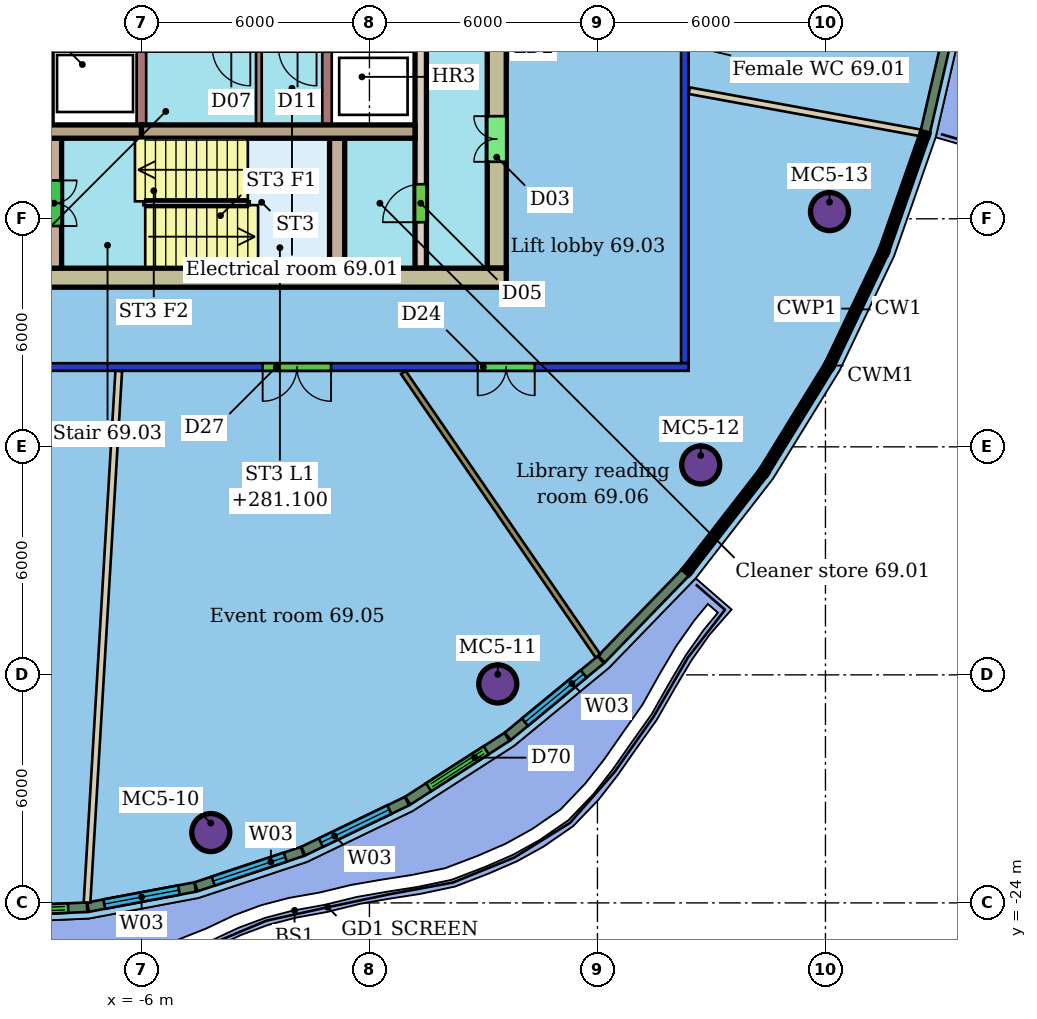
"""IFC4 building model, lengths in metres.
Left out: names, types, materials, properties, quantities, classifications, styles, units other than length and angle.
Written with IfcOpenShell. Run it as: python <this file> out.ifc"""

import sys

from ifc_helpers import new_model, si_unit, direction, frame, frame_2d, origin, origin_2d, place, context, subcontext, project, spatial, rectangle, hollow_circle, extrude, element, fill, save


model = new_model("IFC4")
c1 = context("Model", 3, precision=1e-05, world=origin(), true_north=direction((0.0, 1.0)))
c2 = subcontext(c1, "Body", "Model", "MODEL_VIEW")
j1 = project(units=[si_unit("LENGTHUNIT", "METRE"), si_unit("PLANEANGLEUNIT", "RADIAN")], contexts=[c1])
p1 = place(None, origin())
s1 = spatial("IfcSite", under=j1, at=p1, CompositionType="ELEMENT")
p2 = place(p1, origin())
s2 = spatial("IfcBuilding", under=s1, at=p2, CompositionType="ELEMENT")
p3 = place(p2, frame((0.0, 0.0, 279.3)))
s3 = spatial("IfcBuildingStorey", under=s2, at=p3, CompositionType="ELEMENT", Elevation=279.3)
for number, where, z_axis, x_axis in (
    (1, (-4.175, -22.149, 0.0), (0.0, 0.0, 1.0), (1.0, 0.0, 0.0)),
    (2, (3.377, -18.238, 0.0), (0.0, 0.0, 1.0), (1.0, 0.0, 0.0)),
    (3, (8.718, -12.477, 0.0), (0.0, 0.0, 1.0), (1.0, 0.0, 0.0)),
    (4, (12.106, -5.81, 0.0), (0.0, 0.0, 1.0), (1.0, 0.0, 0.0)),
):
    element("IfcColumn", number, at=place(p3, frame(where, z_axis=z_axis, x_axis=x_axis)), inside=s3, PredefinedType="COLUMN", context=c2, shape_type="SweptSolid", body=[
        extrude(hollow_circle(Radius=0.5, WallThickness=0.04, at=origin_2d()), origin(), (0.0, 0.0, 1.0), 3.45),
    ])
p4 = place(p3, frame((8.4, -9.9, 0.0), z_axis=(0.0, 0.0, 1.0), x_axis=(-1.0, 0.0, 0.0)))
e5 = element("IfcWall", 5, at=p4, inside=s3, PredefinedType="PARTITIONING", context=c2, shape_type="SweptSolid", body=[
    extrude(rectangle(XDim=28.8, YDim=0.2, at=frame_2d((14.4, 0.0))), origin(), (0.0, 0.0, 1.0), 3.1),
])
p5 = place(p4, frame((17.804, 0.0, 0.0)))
e6 = element("IfcOpeningElement", 6, at=p5, cuts=e5, PredefinedType="OPENING", context=c2, shape_type="SweptSolid", body=[
    extrude(rectangle(XDim=1.5, YDim=2.4, at=frame_2d((0.75, 1.2))), frame((0.0, 0.11, 0.0), z_axis=(0.0, -1.0, 0.0), x_axis=(1.0, 0.0, 0.0)), (0.0, 0.0, 1.0), 0.22),
])
p6 = place(p4, frame((9.41, 0.0, 0.0)))
e7 = element("IfcOpeningElement", 7, at=p6, cuts=e5, PredefinedType="OPENING", context=c2, shape_type="SweptSolid", body=[
    extrude(rectangle(XDim=1.8, YDim=2.4, at=frame_2d((0.9, 1.2))), frame((0.0, 0.11, 0.0), z_axis=(0.0, -1.0, 0.0), x_axis=(1.0, 0.0, 0.0)), (0.0, 0.0, 1.0), 0.22),
])
p7 = place(p4, frame((4.051, 0.0, 0.0)))
e8 = element("IfcOpeningElement", 8, at=p7, cuts=e5, PredefinedType="OPENING", context=c2, shape_type="SweptSolid", body=[
    extrude(rectangle(XDim=1.5, YDim=2.1, at=frame_2d((0.75, 1.05))), frame((0.0, 0.11, 0.0), z_axis=(0.0, -1.0, 0.0), x_axis=(1.0, 0.0, 0.0)), (0.0, 0.0, 1.0), 0.22),
])
p8 = place(p3, frame((8.3, 9.8, 0.0), z_axis=(0.0, 0.0, 1.0), x_axis=(0.0, -1.0, 0.0)))
e9 = element("IfcWall", 9, at=p8, inside=s3, PredefinedType="PARTITIONING", context=c2, shape_type="SweptSolid", body=[
    extrude(rectangle(XDim=19.6, YDim=0.2, at=frame_2d((9.8, 0.0))), origin(), (0.0, 0.0, 1.0), 3.1),
])
p9 = place(p8, frame((7.656, 0.0, 0.0)))
e10 = element("IfcOpeningElement", 10, at=p9, cuts=e9, PredefinedType="OPENING", context=c2, shape_type="SweptSolid", body=[
    extrude(rectangle(XDim=1.5, YDim=2.4, at=frame_2d((0.75, 1.2))), frame((0.0, 0.11, 0.0), z_axis=(0.0, -1.0, 0.0), x_axis=(1.0, 0.0, 0.0)), (0.0, 0.0, 1.0), 0.22),
])
p10 = place(p3, frame((-7.431, -23.99, 0.0), z_axis=(0.0, 0.0, 1.0), x_axis=(0.059548467955, 0.998225415407, 0.0)))
e11 = element("IfcWall", 11, at=p10, inside=s3, PredefinedType="PARTITIONING", context=c2, shape_type="SweptSolid", body=[
    extrude(rectangle(XDim=14.009, YDim=0.175, at=frame_2d((7.005, 0.0))), origin(), (0.0, 0.0, 1.0), 3.45),
])
p11 = place(p3, frame((6.013, -17.503, 0.0), z_axis=(0.0, 0.0, 1.0), x_axis=(-0.565875944345, 0.824490397525, 0.0)))
e12 = element("IfcWall", 12, at=p11, inside=s3, PredefinedType="PARTITIONING", context=c2, shape_type="SweptSolid", body=[
    extrude(rectangle(XDim=9.049, YDim=0.15, at=frame_2d((4.524, 0.0))), origin(), (0.0, 0.0, 1.0), 3.45),
])
p12 = place(p3, frame((14.492, -3.738, 0.0), z_axis=(0.0, 0.0, 1.0), x_axis=(-0.98376729686, 0.1794488942, 0.0)))
e13 = element("IfcWall", 13, at=p12, inside=s3, PredefinedType="PARTITIONING", context=c2, shape_type="SweptSolid", body=[
    extrude(rectangle(XDim=6.177, YDim=0.175, at=frame_2d((3.088, 0.0))), origin(), (0.0, 0.0, 1.0), 3.45),
])
p13 = place(p3, frame((-10.221, -24.235, 0.0), z_axis=(0.0, 0.0, 1.0), x_axis=(0.999063892299, 0.043258977142, 0.0)))
e14 = element("IfcWall", 14, at=p13, inside=s3, PredefinedType="SOLIDWALL", context=c2, shape_type="SweptSolid", body=[
    extrude(rectangle(XDim=2.794, YDim=0.25, at=frame_2d((1.397, 0.0))), origin(), (0.0, 0.0, 1.0), 3.15),
])
p14 = place(p13, frame((0.497, 0.0, 0.0)))
e15 = element("IfcOpeningElement", 15, at=p14, cuts=e14, PredefinedType="OPENING", context=c2, shape_type="SweptSolid", body=[
    extrude(rectangle(XDim=1.8, YDim=2.4, at=frame_2d((0.9, 1.2))), frame((0.0, 0.135, 0.0), z_axis=(0.0, -1.0, 0.0), x_axis=(1.0, 0.0, 0.0)), (0.0, 0.0, 1.0), 0.27),
])
p15 = place(p3, frame((-7.404, -24.111, 0.0), z_axis=(0.0, 0.0, 1.0), x_axis=(0.982821071431, 0.184560942647, 0.0)))
e16 = element("IfcWall", 16, at=p15, inside=s3, PredefinedType="SOLIDWALL", context=c2, shape_type="SweptSolid", body=[
    extrude(rectangle(XDim=2.868, YDim=0.25, at=frame_2d((1.434, 0.0))), origin(), (0.0, 0.0, 1.0), 3.15),
])
p16 = place(p15, frame((0.434, 0.0, 0.9)))
e17 = element("IfcOpeningElement", 17, at=p16, cuts=e16, PredefinedType="OPENING", context=c2, shape_type="SweptSolid", body=[
    extrude(rectangle(XDim=2.0, YDim=2.1, at=frame_2d((1.0, 1.05))), frame((0.0, 0.135, 0.0), z_axis=(0.0, -1.0, 0.0), x_axis=(1.0, 0.0, 0.0)), (0.0, 0.0, 1.0), 0.27),
])
p17 = place(p3, frame((-4.562, -23.576, 0.0), z_axis=(0.0, 0.0, 1.0), x_axis=(0.948964440236, 0.315383086368, 0.0)))
e18 = element("IfcWall", 18, at=p17, inside=s3, PredefinedType="SOLIDWALL", context=c2, shape_type="SweptSolid", body=[
    extrude(rectangle(XDim=2.948, YDim=0.25, at=frame_2d((1.474, 0.0))), origin(), (0.0, 0.0, 1.0), 3.15),
])
p18 = place(p17, frame((0.474, 0.0, 0.9)))
e19 = element("IfcOpeningElement", 19, at=p18, cuts=e18, PredefinedType="OPENING", context=c2, shape_type="SweptSolid", body=[
    extrude(rectangle(XDim=2.0, YDim=2.1, at=frame_2d((1.0, 1.05))), frame((0.0, 0.135, 0.0), z_axis=(0.0, -1.0, 0.0), x_axis=(1.0, 0.0, 0.0)), (0.0, 0.0, 1.0), 0.27),
])
p19 = place(p3, frame((-1.741, -22.637, 0.0), z_axis=(0.0, 0.0, 1.0), x_axis=(0.900781065891, 0.434273498308, 0.0)))
e20 = element("IfcWall", 20, at=p19, inside=s3, PredefinedType="SOLIDWALL", context=c2, shape_type="SweptSolid", body=[
    extrude(rectangle(XDim=3.03, YDim=0.25, at=frame_2d((1.515, 0.0))), origin(), (0.0, 0.0, 1.0), 3.15),
])
p20 = place(p19, frame((0.515, 0.0, 0.9)))
e21 = element("IfcOpeningElement", 21, at=p20, cuts=e20, PredefinedType="OPENING", context=c2, shape_type="SweptSolid", body=[
    extrude(rectangle(XDim=2.0, YDim=2.1, at=frame_2d((1.0, 1.05))), frame((0.0, 0.135, 0.0), z_axis=(0.0, -1.0, 0.0), x_axis=(1.0, 0.0, 0.0)), (0.0, 0.0, 1.0), 0.27),
])
p21 = place(p3, frame((1.008, -21.31, 0.0), z_axis=(0.0, 0.0, 1.0), x_axis=(0.841150380815, 0.540801291469, 0.0)))
e22 = element("IfcWall", 22, at=p21, inside=s3, PredefinedType="SOLIDWALL", context=c2, shape_type="SweptSolid", body=[
    extrude(rectangle(XDim=3.106, YDim=0.25, at=frame_2d((1.553, 0.0))), origin(), (0.0, 0.0, 1.0), 3.15),
])
p22 = place(p21, frame((0.653, 0.0, 0.0)))
e23 = element("IfcOpeningElement", 23, at=p22, cuts=e22, PredefinedType="OPENING", context=c2, shape_type="SweptSolid", body=[
    extrude(rectangle(XDim=1.8, YDim=2.4, at=frame_2d((0.9, 1.2))), frame((0.0, 0.135, 0.0), z_axis=(0.0, -1.0, 0.0), x_axis=(1.0, 0.0, 0.0)), (0.0, 0.0, 1.0), 0.27),
])
p23 = place(p3, frame((3.639, -19.617, 0.0), z_axis=(0.0, 0.0, 1.0), x_axis=(0.772343261753, 0.635205388851, 0.0)))
e24 = element("IfcWall", 24, at=p23, inside=s3, PredefinedType="SOLIDWALL", context=c2, shape_type="SweptSolid", body=[
    extrude(rectangle(XDim=3.172, YDim=0.25, at=frame_2d((1.586, 0.0))), origin(), (0.0, 0.0, 1.0), 3.15),
])
p24 = place(p23, frame((0.586, 0.0, 0.9)))
e25 = element("IfcOpeningElement", 25, at=p24, cuts=e24, PredefinedType="OPENING", context=c2, shape_type="SweptSolid", body=[
    extrude(rectangle(XDim=2.0, YDim=2.1, at=frame_2d((1.0, 1.05))), frame((0.0, 0.135, 0.0), z_axis=(0.0, -1.0, 0.0), x_axis=(1.0, 0.0, 0.0)), (0.0, 0.0, 1.0), 0.27),
])
p25 = place(p3, frame((6.105, -17.587, 0.0), z_axis=(0.0, 0.0, 1.0), x_axis=(0.695972067976, 0.718068855053, 0.0)))
e26 = element("IfcWall", 26, at=p25, inside=s3, PredefinedType="SOLIDWALL", context=c2, shape_type="SweptSolid", body=[
    extrude(rectangle(XDim=3.182, YDim=0.25, at=frame_2d((1.591, 0.0))), origin(), (0.0, 0.0, 1.0), 3.15),
])
p26 = place(p3, frame((14.625, -3.719, 0.0), z_axis=(0.0, 0.0, 1.0), x_axis=(0.225201327467, 0.974312250825, 0.0)))
e27 = element("IfcWall", 27, at=p26, inside=s3, PredefinedType="SOLIDWALL", context=c2, shape_type="SweptSolid", body=[
    extrude(rectangle(XDim=3.182, YDim=0.25, at=frame_2d((1.591, 0.0))), origin(), (0.0, 0.0, 1.0), 3.15),
])
p27 = place(p3, frame((-15.6, -7.55, 0.0), z_axis=(0.0, 0.0, 1.0), x_axis=(1.0, 0.0, 0.0)))
e28 = element("IfcWall", 28, at=p27, inside=s3, PredefinedType="SHEAR", context=c2, shape_type="SweptSolid", body=[
    extrude(rectangle(XDim=19.2, YDim=0.5, at=frame_2d((9.6, 0.0))), origin(), (0.0, 0.0, 1.0), 3.3),
])
p28 = place(p27, frame((3.6, 0.0, 0.0)))
e29 = element("IfcOpeningElement", 29, at=p28, cuts=e28, PredefinedType="OPENING", context=c2, shape_type="SweptSolid", body=[
    extrude(rectangle(XDim=1.2, YDim=2.1, at=frame_2d((0.6, 1.05))), frame((0.0, 0.26, 0.0), z_axis=(0.0, -1.0, 0.0), x_axis=(1.0, 0.0, 0.0)), (0.0, 0.0, 1.0), 0.52),
])
p29 = place(p3, frame((3.35, -7.3, 0.0), z_axis=(0.0, 0.0, 1.0), x_axis=(0.0, 1.0, 0.0)))
e30 = element("IfcWall", 30, at=p29, inside=s3, PredefinedType="SHEAR", context=c2, shape_type="SweptSolid", body=[
    extrude(rectangle(XDim=14.6, YDim=0.5, at=frame_2d((7.3, 0.0))), origin(), (0.0, 0.0, 1.0), 3.3),
])
p30 = place(p29, frame((2.8, 0.0, 0.0)))
e31 = element("IfcOpeningElement", 31, at=p30, cuts=e30, PredefinedType="OPENING", context=c2, shape_type="SweptSolid", body=[
    extrude(rectangle(XDim=1.2, YDim=2.1, at=frame_2d((0.6, 1.05))), frame((0.0, 0.26, 0.0), z_axis=(0.0, -1.0, 0.0), x_axis=(1.0, 0.0, 0.0)), (0.0, 0.0, 1.0), 0.52),
])
p31 = place(p29, frame((10.6, 0.0, 0.0)))
e32 = element("IfcOpeningElement", 32, at=p31, cuts=e30, PredefinedType="OPENING", context=c2, shape_type="SweptSolid", body=[
    extrude(rectangle(XDim=1.2, YDim=2.1, at=frame_2d((0.6, 1.05))), frame((0.0, 0.26, 0.0), z_axis=(0.0, -1.0, 0.0), x_axis=(1.0, 0.0, 0.0)), (0.0, 0.0, 1.0), 0.52),
])
p32 = place(p3, frame((-13.2, -3.705, 0.0), z_axis=(0.0, 0.0, 1.0), x_axis=(1.0, 0.0, 0.0)))
e33 = element("IfcWall", 33, at=p32, inside=s3, PredefinedType="SHEAR", context=c2, shape_type="SweptSolid", body=[
    extrude(rectangle(XDim=7.2, YDim=0.35, at=frame_2d((3.6, 0.0))), origin(), (0.0, 0.0, 1.0), 3.3),
])
p33 = place(p32, frame((0.496, 0.0, 0.0)))
e34 = element("IfcOpeningElement", 34, at=p33, cuts=e33, PredefinedType="OPENING", context=c2, shape_type="SweptSolid", body=[
    extrude(rectangle(XDim=1.2, YDim=2.1, at=frame_2d((0.6, 1.05))), frame((0.0, 0.185, 0.0), z_axis=(0.0, -1.0, 0.0), x_axis=(1.0, 0.0, 0.0)), (0.0, 0.0, 1.0), 0.37),
])
p34 = place(p32, frame((2.938, 0.0, 0.0)))
e35 = element("IfcOpeningElement", 35, at=p34, cuts=e33, PredefinedType="OPENING", context=c2, shape_type="SweptSolid", body=[
    extrude(rectangle(XDim=1.2, YDim=2.1, at=frame_2d((0.6, 1.05))), frame((0.0, 0.185, 0.0), z_axis=(0.0, -1.0, 0.0), x_axis=(1.0, 0.0, 0.0)), (0.0, 0.0, 1.0), 0.37),
])
p35 = place(p3, frame((-6.0, -3.705, 0.0), z_axis=(0.0, 0.0, 1.0), x_axis=(1.0, 0.0, 0.0)))
e36 = element("IfcWall", 36, at=p35, inside=s3, PredefinedType="SHEAR", context=c2, shape_type="SweptSolid", body=[
    extrude(rectangle(XDim=7.2, YDim=0.35, at=frame_2d((3.6, 0.0))), origin(), (0.0, 0.0, 1.0), 3.3),
])
p36 = place(p3, frame((1.35, -7.3, 0.0), z_axis=(0.0, 0.0, 1.0), x_axis=(0.0, 1.0, 0.0)))
e37 = element("IfcWall", 37, at=p36, inside=s3, PredefinedType="SHEAR", context=c2, shape_type="SweptSolid", body=[
    extrude(rectangle(XDim=14.6, YDim=0.3, at=frame_2d((7.3, 0.0))), origin(), (0.0, 0.0, 1.0), 3.3),
])
p37 = place(p36, frame((1.21, 0.0, 0.0)))
e38 = element("IfcOpeningElement", 38, at=p37, cuts=e37, PredefinedType="OPENING", context=c2, shape_type="SweptSolid", body=[
    extrude(rectangle(XDim=1.0, YDim=2.1, at=frame_2d((0.5, 1.05))), frame((0.0, 0.16, 0.0), z_axis=(0.0, -1.0, 0.0), x_axis=(1.0, 0.0, 0.0)), (0.0, 0.0, 1.0), 0.32),
])
p38 = place(p36, frame((6.55, 0.0, 0.0)))
e39 = element("IfcOpeningElement", 39, at=p38, cuts=e37, PredefinedType="OPENING", context=c2, shape_type="SweptSolid", body=[
    extrude(rectangle(XDim=1.5, YDim=2.1, at=frame_2d((0.75, 1.05))), frame((0.0, 0.16, 0.0), z_axis=(0.0, -1.0, 0.0), x_axis=(1.0, 0.0, 0.0)), (0.0, 0.0, 1.0), 0.32),
])
p39 = place(p3, frame((-8.3, -3.88, 0.0), z_axis=(0.0, 0.0, 1.0), x_axis=(0.0, -1.0, 0.0)))
e40 = element("IfcWall", 40, at=p39, inside=s3, PredefinedType="SHEAR", context=c2, shape_type="SweptSolid", body=[
    extrude(rectangle(XDim=3.42, YDim=0.4, at=frame_2d((1.71, 0.0))), origin(), (0.0, 0.0, 1.0), 3.3),
])
p40 = place(p39, frame((1.11, 0.0, 0.0)))
e41 = element("IfcOpeningElement", 41, at=p40, cuts=e40, PredefinedType="OPENING", context=c2, shape_type="SweptSolid", body=[
    extrude(rectangle(XDim=1.2, YDim=2.1, at=frame_2d((0.6, 1.05))), frame((0.0, 0.21, 0.0), z_axis=(0.0, -1.0, 0.0), x_axis=(1.0, 0.0, 0.0)), (0.0, 0.0, 1.0), 0.42),
])
p41 = place(p3, frame((-0.85, -3.88, 0.0), z_axis=(0.0, 0.0, 1.0), x_axis=(0.0, -1.0, 0.0)))
e42 = element("IfcWall", 42, at=p41, inside=s3, PredefinedType="SHEAR", context=c2, shape_type="SweptSolid", body=[
    extrude(rectangle(XDim=3.42, YDim=0.4, at=frame_2d((1.71, 0.0))), origin(), (0.0, 0.0, 1.0), 3.3),
])
for number, where, z_axis, x_axis in (
    (43, (-8.442, -1.6, 0.0), (0.0, 0.0, 1.0), (0.0, -1.0, 0.0)),
    (44, (-6.0, -1.6, 0.0), (0.0, 0.0, 1.0), (0.0, -1.0, 0.0)),
    (45, (-1.117, -1.6, 0.0), (0.0, 0.0, 1.0), (0.0, -1.0, 0.0)),
):
    element("IfcWall", number, at=place(p3, frame(where, z_axis=z_axis, x_axis=x_axis)), inside=s3, PredefinedType="SHEAR", context=c2, shape_type="SweptSolid", body=[
        extrude(rectangle(XDim=1.93, YDim=0.25, at=frame_2d((0.965, 0.0))), origin(), (0.0, 0.0, 1.0), 3.3),
    ])
p42 = place(p3, frame((-2.91, -1.6, 0.0), z_axis=(0.0, 0.0, 1.0), x_axis=(0.0, -1.0, 0.0)))
e46 = element("IfcWall", 46, at=p42, inside=s3, PredefinedType="PARTITIONING", context=c2, shape_type="SweptSolid", body=[
    extrude(rectangle(XDim=1.93, YDim=0.15, at=frame_2d((0.965, 0.0))), origin(), (0.0, 0.0, 1.0), 3.3),
])
p43 = place(p6, origin())
e47 = element("IfcDoor", 47, at=p43, inside=s3, OperationType="DOUBLE_DOOR_SINGLE_SWING", PredefinedType="DOOR", context=c2, shape_type="SweptSolid", body=[
    extrude(rectangle(XDim=1.8, YDim=2.4, at=frame_2d((0.9, 1.2))), frame((0.0, 0.025, 0.0), z_axis=(0.0, -1.0, 0.0), x_axis=(1.0, 0.0, 0.0)), (0.0, 0.0, 1.0), 0.05),
])
fill(e7, e47)
p44 = place(p7, origin())
e48 = element("IfcDoor", 48, at=p44, inside=s3, OperationType="DOUBLE_DOOR_SINGLE_SWING", PredefinedType="DOOR", context=c2, shape_type="SweptSolid", body=[
    extrude(rectangle(XDim=1.5, YDim=2.1, at=frame_2d((0.75, 1.05))), frame((0.0, 0.025, 0.0), z_axis=(0.0, -1.0, 0.0), x_axis=(1.0, 0.0, 0.0)), (0.0, 0.0, 1.0), 0.05),
])
fill(e8, e48)
p45 = place(p14, origin())
e49 = element("IfcDoor", 49, at=p45, inside=s3, OperationType="DOUBLE_DOOR_SLIDING", PredefinedType="DOOR", context=c2, shape_type="SweptSolid", body=[
    extrude(rectangle(XDim=1.8, YDim=2.4, at=frame_2d((0.9, 1.2))), frame((0.0, 0.025, 0.0), z_axis=(0.0, -1.0, 0.0), x_axis=(1.0, 0.0, 0.0)), (0.0, 0.0, 1.0), 0.05),
])
fill(e15, e49)
p46 = place(p16, origin())
e50 = element("IfcWindow", 50, at=p46, inside=s3, PartitioningType="SINGLE_PANEL", PredefinedType="WINDOW", context=c2, shape_type="SweptSolid", body=[
    extrude(rectangle(XDim=2.0, YDim=2.1, at=frame_2d((1.0, 1.05))), frame((0.0, 0.03, 0.0), z_axis=(0.0, -1.0, 0.0), x_axis=(1.0, 0.0, 0.0)), (0.0, 0.0, 1.0), 0.06),
])
fill(e17, e50)
p47 = place(p18, origin())
e51 = element("IfcWindow", 51, at=p47, inside=s3, PartitioningType="SINGLE_PANEL", PredefinedType="WINDOW", context=c2, shape_type="SweptSolid", body=[
    extrude(rectangle(XDim=2.0, YDim=2.1, at=frame_2d((1.0, 1.05))), frame((0.0, 0.03, 0.0), z_axis=(0.0, -1.0, 0.0), x_axis=(1.0, 0.0, 0.0)), (0.0, 0.0, 1.0), 0.06),
])
fill(e19, e51)
p48 = place(p20, origin())
e52 = element("IfcWindow", 52, at=p48, inside=s3, PartitioningType="SINGLE_PANEL", PredefinedType="WINDOW", context=c2, shape_type="SweptSolid", body=[
    extrude(rectangle(XDim=2.0, YDim=2.1, at=frame_2d((1.0, 1.05))), frame((0.0, 0.03, 0.0), z_axis=(0.0, -1.0, 0.0), x_axis=(1.0, 0.0, 0.0)), (0.0, 0.0, 1.0), 0.06),
])
fill(e21, e52)
p49 = place(p22, origin())
e53 = element("IfcDoor", 53, at=p49, inside=s3, OperationType="DOUBLE_DOOR_SLIDING", PredefinedType="DOOR", context=c2, shape_type="SweptSolid", body=[
    extrude(rectangle(XDim=1.8, YDim=2.4, at=frame_2d((0.9, 1.2))), frame((0.0, 0.025, 0.0), z_axis=(0.0, -1.0, 0.0), x_axis=(1.0, 0.0, 0.0)), (0.0, 0.0, 1.0), 0.05),
])
fill(e23, e53)
p50 = place(p24, origin())
e54 = element("IfcWindow", 54, at=p50, inside=s3, PartitioningType="SINGLE_PANEL", PredefinedType="WINDOW", context=c2, shape_type="SweptSolid", body=[
    extrude(rectangle(XDim=2.0, YDim=2.1, at=frame_2d((1.0, 1.05))), frame((0.0, 0.03, 0.0), z_axis=(0.0, -1.0, 0.0), x_axis=(1.0, 0.0, 0.0)), (0.0, 0.0, 1.0), 0.06),
])
fill(e25, e54)
p51 = place(p30, origin())
e55 = element("IfcDoor", 55, at=p51, inside=s3, OperationType="DOUBLE_DOOR_SINGLE_SWING", PredefinedType="NOTDEFINED", context=c2, shape_type="SweptSolid", body=[
    extrude(rectangle(XDim=1.2, YDim=2.1, at=frame_2d((0.6, 1.05))), frame((0.0, 0.025, 0.0), z_axis=(0.0, -1.0, 0.0), x_axis=(1.0, 0.0, 0.0)), (0.0, 0.0, 1.0), 0.05),
])
fill(e31, e55)
p52 = place(p37, origin())
e56 = element("IfcDoor", 56, at=p52, inside=s3, OperationType="SINGLE_SWING_LEFT", PredefinedType="NOTDEFINED", context=c2, shape_type="SweptSolid", body=[
    extrude(rectangle(XDim=1.0, YDim=2.1, at=frame_2d((0.5, 1.05))), frame((0.0, 0.025, 0.0), z_axis=(0.0, -1.0, 0.0), x_axis=(1.0, 0.0, 0.0)), (0.0, 0.0, 1.0), 0.05),
])
fill(e38, e56)
p53 = place(p40, origin())
e57 = element("IfcDoor", 57, at=p53, inside=s3, OperationType="DOUBLE_DOOR_SINGLE_SWING", PredefinedType="NOTDEFINED", context=c2, shape_type="SweptSolid", body=[
    extrude(rectangle(XDim=1.2, YDim=2.1, at=frame_2d((0.6, 1.05))), frame((0.0, 0.025, 0.0), z_axis=(0.0, -1.0, 0.0), x_axis=(1.0, 0.0, 0.0)), (0.0, 0.0, 1.0), 0.05),
])
fill(e41, e57)
save(model, sys.argv[1])
